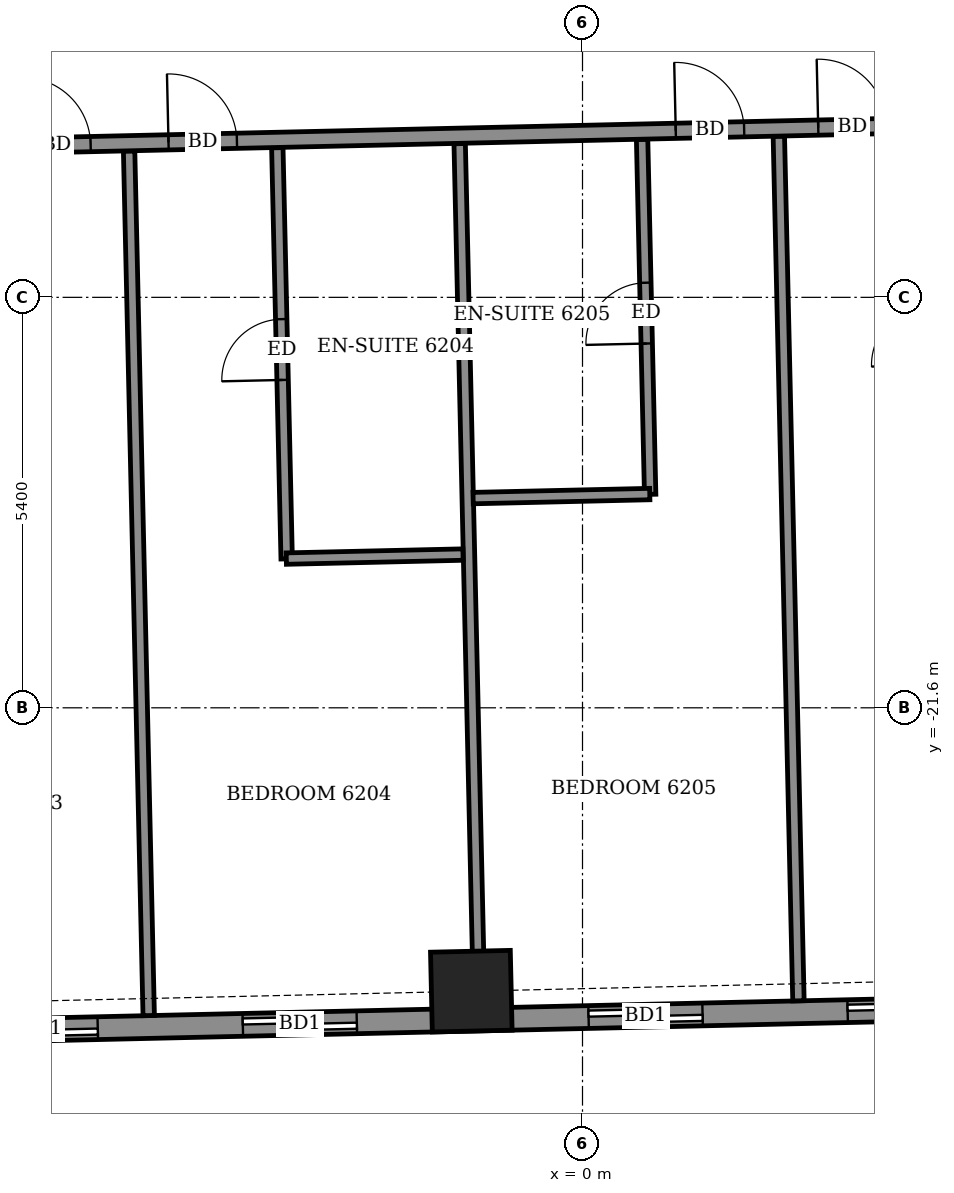
"""IFC4 building model, lengths in metres.
Left out: names, types, materials, properties, quantities, classifications, styles, units other than length and angle.
Written with IfcOpenShell. Run it as: python <this file> out.ifc"""

import sys

from ifc_helpers import new_model, si_unit, direction, frame, frame_2d, origin, origin_2d, place, context, subcontext, project, spatial, rectangle, extrude, element, fill, save


model = new_model("IFC4")
c1 = context("Model", 3, precision=1e-05, world=origin(), true_north=direction((0.0, 1.0)))
c2 = subcontext(c1, "Body", "Model", "MODEL_VIEW")
j1 = project(units=[si_unit("LENGTHUNIT", "METRE"), si_unit("PLANEANGLEUNIT", "RADIAN")], contexts=[c1])
p1 = place(None, origin())
s1 = spatial("IfcSite", under=j1, at=p1, CompositionType="ELEMENT")
p2 = place(p1, origin())
s2 = spatial("IfcBuilding", under=s1, at=p2, CompositionType="ELEMENT")
p3 = place(p2, frame((0.0, 0.0, 245.5)))
s3 = spatial("IfcBuildingStorey", under=s2, at=p3, CompositionType="ELEMENT", Elevation=245.5)
p4 = place(p3, frame((-1.463, -25.328, -0.55), z_axis=(0.0, 0.0, 1.0), x_axis=(0.999743095343, 0.022665906441, 0.0)))
e1 = element("IfcColumn", 1, at=p4, inside=s3, PredefinedType="COLUMN", context=c2, shape_type="SweptSolid", body=[
    extrude(rectangle(XDim=1.05, YDim=1.05, at=origin_2d()), origin(), (0.0, 0.0, 1.0), 3.6),
])
p5 = place(p3, frame((-23.403, -26.201, 0.0), z_axis=(0.0, 0.0, 1.0), x_axis=(0.999742770494, 0.022680230258, 0.0)))
e2 = element("IfcWall", 2, at=p5, inside=s3, PredefinedType="SOLIDWALL", context=c2, shape_type="SweptSolid", body=[
    extrude(rectangle(XDim=43.908, YDim=0.3, at=frame_2d((21.954, 0.0))), origin(), (0.0, 0.0, 1.0), 2.55),
])
p6 = place(p5, frame((1.951, 0.0, 0.0)))
e3 = element("IfcOpeningElement", 3, at=p6, cuts=e2, PredefinedType="OPENING", context=c2, shape_type="SweptSolid", body=[
    extrude(rectangle(XDim=1.5, YDim=2.4, at=frame_2d((0.75, 1.2))), frame((0.0, 0.16, 0.0), z_axis=(0.0, -1.0, 0.0), x_axis=(1.0, 0.0, 0.0)), (0.0, 0.0, 1.0), 0.32),
])
p7 = place(p5, frame((5.272, 0.0, 0.0)))
e4 = element("IfcOpeningElement", 4, at=p7, cuts=e2, PredefinedType="OPENING", context=c2, shape_type="SweptSolid", body=[
    extrude(rectangle(XDim=1.2, YDim=2.4, at=frame_2d((0.6, 1.2))), frame((0.0, 0.16, 0.0), z_axis=(0.0, -1.0, 0.0), x_axis=(1.0, 0.0, 0.0)), (0.0, 0.0, 1.0), 0.32),
])
p8 = place(p5, frame((10.475, 0.0, 0.0)))
e5 = element("IfcOpeningElement", 5, at=p8, cuts=e2, PredefinedType="OPENING", context=c2, shape_type="SweptSolid", body=[
    extrude(rectangle(XDim=1.5, YDim=2.4, at=frame_2d((0.75, 1.2))), frame((0.0, 0.16, 0.0), z_axis=(0.0, -1.0, 0.0), x_axis=(1.0, 0.0, 0.0)), (0.0, 0.0, 1.0), 0.32),
])
p9 = place(p5, frame((15.53, 0.0, 0.0)))
e6 = element("IfcOpeningElement", 6, at=p9, cuts=e2, PredefinedType="OPENING", context=c2, shape_type="SweptSolid", body=[
    extrude(rectangle(XDim=1.5, YDim=2.4, at=frame_2d((0.75, 1.2))), frame((0.0, 0.16, 0.0), z_axis=(0.0, -1.0, 0.0), x_axis=(1.0, 0.0, 0.0)), (0.0, 0.0, 1.0), 0.32),
])
p10 = place(p5, frame((18.939, 0.0, 0.0)))
e7 = element("IfcOpeningElement", 7, at=p10, cuts=e2, PredefinedType="OPENING", context=c2, shape_type="SweptSolid", body=[
    extrude(rectangle(XDim=1.5, YDim=2.4, at=frame_2d((0.75, 1.2))), frame((0.0, 0.16, 0.0), z_axis=(0.0, -1.0, 0.0), x_axis=(1.0, 0.0, 0.0)), (0.0, 0.0, 1.0), 0.32),
])
p11 = place(p5, frame((23.489, 0.0, 0.0)))
e8 = element("IfcOpeningElement", 8, at=p11, cuts=e2, PredefinedType="OPENING", context=c2, shape_type="SweptSolid", body=[
    extrude(rectangle(XDim=1.5, YDim=2.4, at=frame_2d((0.75, 1.2))), frame((0.0, 0.16, 0.0), z_axis=(0.0, -1.0, 0.0), x_axis=(1.0, 0.0, 0.0)), (0.0, 0.0, 1.0), 0.32),
])
p12 = place(p5, frame((26.898, 0.0, 0.0)))
e9 = element("IfcOpeningElement", 9, at=p12, cuts=e2, PredefinedType="OPENING", context=c2, shape_type="SweptSolid", body=[
    extrude(rectangle(XDim=1.5, YDim=2.4, at=frame_2d((0.75, 1.2))), frame((0.0, 0.16, 0.0), z_axis=(0.0, -1.0, 0.0), x_axis=(1.0, 0.0, 0.0)), (0.0, 0.0, 1.0), 0.32),
])
p13 = place(p5, frame((32.05, 0.0, 0.0)))
e10 = element("IfcOpeningElement", 10, at=p13, cuts=e2, PredefinedType="OPENING", context=c2, shape_type="SweptSolid", body=[
    extrude(rectangle(XDim=1.5, YDim=2.4, at=frame_2d((0.75, 1.2))), frame((0.0, 0.16, 0.0), z_axis=(0.0, -1.0, 0.0), x_axis=(1.0, 0.0, 0.0)), (0.0, 0.0, 1.0), 0.32),
])
p14 = place(p5, frame((37.382, 0.0, 0.0)))
e11 = element("IfcOpeningElement", 11, at=p14, cuts=e2, PredefinedType="OPENING", context=c2, shape_type="SweptSolid", body=[
    extrude(rectangle(XDim=1.5, YDim=2.4, at=frame_2d((0.75, 1.2))), frame((0.0, 0.16, 0.0), z_axis=(0.0, -1.0, 0.0), x_axis=(1.0, 0.0, 0.0)), (0.0, 0.0, 1.0), 0.32),
])
p15 = place(p5, frame((40.057, 0.0, 0.9)))
e12 = element("IfcOpeningElement", 12, at=p15, cuts=e2, PredefinedType="OPENING", context=c2, shape_type="SweptSolid", body=[
    extrude(rectangle(XDim=2.4, YDim=1.5, at=frame_2d((1.2, 0.75))), frame((0.0, 0.16, 0.0), z_axis=(0.0, -1.0, 0.0), x_axis=(1.0, 0.0, 0.0)), (0.0, 0.0, 1.0), 0.32),
])
p16 = place(p3, frame((-5.707, -25.649, 0.0), z_axis=(0.0, 0.0, 1.0), x_axis=(-0.022684355347, 0.999742676904, 0.0)))
e13 = element("IfcWall", 13, at=p16, inside=s3, PredefinedType="PARTITIONING", context=c2, shape_type="SweptSolid", body=[
    extrude(rectangle(XDim=11.376, YDim=0.15, at=frame_2d((5.688, 0.0))), origin(), (0.0, 0.0, 1.0), 2.5),
])
p17 = place(p3, frame((-1.358, -25.551, 0.0), z_axis=(0.0, 0.0, 1.0), x_axis=(-0.022684355347, 0.999742676904, 0.0)))
e14 = element("IfcWall", 14, at=p17, inside=s3, PredefinedType="PARTITIONING", context=c2, shape_type="SweptSolid", body=[
    extrude(rectangle(XDim=11.376, YDim=0.15, at=frame_2d((5.688, 0.0))), origin(), (0.0, 0.0, 1.0), 3.05),
])
p18 = place(p3, frame((2.841, -25.455, 0.0), z_axis=(0.0, 0.0, 1.0), x_axis=(-0.022684355347, 0.999742676904, 0.0)))
e15 = element("IfcWall", 15, at=p18, inside=s3, PredefinedType="PARTITIONING", context=c2, shape_type="SweptSolid", body=[
    extrude(rectangle(XDim=11.376, YDim=0.15, at=frame_2d((5.688, 0.0))), origin(), (0.0, 0.0, 1.0), 2.5),
])
p19 = place(p3, frame((-3.892, -19.641, 0.0), z_axis=(0.0, 0.0, 1.0), x_axis=(-0.022696805576, 0.999742394328, 0.0)))
e16 = element("IfcWall", 16, at=p19, inside=s3, PredefinedType="PARTITIONING", context=c2, shape_type="SweptSolid", body=[
    extrude(rectangle(XDim=5.411, YDim=0.15, at=frame_2d((2.705, 0.0))), origin(), (0.0, 0.0, 1.0), 3.05),
])
p20 = place(p19, frame((2.355, 0.0, 0.0)))
e17 = element("IfcOpeningElement", 17, at=p20, cuts=e16, PredefinedType="OPENING", context=c2, shape_type="SweptSolid", body=[
    extrude(rectangle(XDim=0.8, YDim=2.1, at=frame_2d((0.4, 1.05))), frame((0.0, 0.085, 0.0), z_axis=(0.0, -1.0, 0.0), x_axis=(1.0, 0.0, 0.0)), (0.0, 0.0, 1.0), 0.17),
])
p21 = place(p3, frame((-3.897, -19.637, 0.0), z_axis=(0.0, 0.0, 1.0), x_axis=(0.999740478815, 0.022781023197, 0.0)))
e18 = element("IfcWall", 18, at=p21, inside=s3, PredefinedType="PARTITIONING", context=c2, shape_type="SweptSolid", body=[
    extrude(rectangle(XDim=2.325, YDim=0.15, at=frame_2d((1.163, 0.0))), origin(), (0.0, 0.0, 1.0), 3.05),
])
p22 = place(p3, frame((0.89, -18.792, 0.0), z_axis=(0.0, 0.0, 1.0), x_axis=(-0.022688155425, 0.999742590672, 0.0)))
e19 = element("IfcWall", 19, at=p22, inside=s3, PredefinedType="PARTITIONING", context=c2, shape_type="SweptSolid", body=[
    extrude(rectangle(XDim=4.67, YDim=0.15, at=frame_2d((2.335, 0.0))), origin(), (0.0, 0.0, 1.0), 3.05),
])
p23 = place(p22, frame((1.985, 0.0, 0.0)))
e20 = element("IfcOpeningElement", 20, at=p23, cuts=e19, PredefinedType="OPENING", context=c2, shape_type="SweptSolid", body=[
    extrude(rectangle(XDim=0.8, YDim=2.1, at=frame_2d((0.4, 1.05))), frame((0.0, 0.085, 0.0), z_axis=(0.0, -1.0, 0.0), x_axis=(1.0, 0.0, 0.0)), (0.0, 0.0, 1.0), 0.17),
])
p24 = place(p3, frame((-1.439, -18.841, 0.0), z_axis=(0.0, 0.0, 1.0), x_axis=(0.999740260747, 0.02279059109, 0.0)))
e21 = element("IfcWall", 21, at=p24, inside=s3, PredefinedType="PARTITIONING", context=c2, shape_type="SweptSolid", body=[
    extrude(rectangle(XDim=2.324, YDim=0.15, at=frame_2d((1.162, 0.0))), origin(), (0.0, 0.0, 1.0), 3.05),
])
p25 = place(p3, frame((-27.016, -14.65, 0.0), z_axis=(0.0, 0.0, 1.0), x_axis=(0.999742874861, 0.022675629315, 0.0)))
e22 = element("IfcWall", 22, at=p25, inside=s3, PredefinedType="PARTITIONING", context=c2, shape_type="SweptSolid", body=[
    extrude(rectangle(XDim=50.883, YDim=0.2, at=frame_2d((25.442, 0.0))), origin(), (0.0, 0.0, 1.0), 3.05),
])
p26 = place(p25, frame((1.575, 0.0, 0.0)))
e23 = element("IfcOpeningElement", 23, at=p26, cuts=e22, PredefinedType="OPENING", context=c2, shape_type="SweptSolid", body=[
    extrude(rectangle(XDim=1.0, YDim=2.1, at=frame_2d((0.5, 1.05))), frame((0.0, 0.11, 0.0), z_axis=(0.0, -1.0, 0.0), x_axis=(1.0, 0.0, 0.0)), (0.0, 0.0, 1.0), 0.22),
])
p27 = place(p25, frame((6.4, 0.0, 0.0)))
e24 = element("IfcOpeningElement", 24, at=p27, cuts=e22, PredefinedType="OPENING", context=c2, shape_type="SweptSolid", body=[
    extrude(rectangle(XDim=0.9, YDim=2.1, at=frame_2d((0.45, 1.05))), frame((0.0, 0.11, 0.0), z_axis=(0.0, -1.0, 0.0), x_axis=(1.0, 0.0, 0.0)), (0.0, 0.0, 1.0), 0.22),
])
p28 = place(p25, frame((11.025, 0.0, 0.0)))
e25 = element("IfcOpeningElement", 25, at=p28, cuts=e22, PredefinedType="OPENING", context=c2, shape_type="SweptSolid", body=[
    extrude(rectangle(XDim=0.9, YDim=2.1, at=frame_2d((0.45, 1.05))), frame((0.0, 0.11, 0.0), z_axis=(0.0, -1.0, 0.0), x_axis=(1.0, 0.0, 0.0)), (0.0, 0.0, 1.0), 0.22),
])
p29 = place(p25, frame((12.925, 0.0, 0.0)))
e26 = element("IfcOpeningElement", 26, at=p29, cuts=e22, PredefinedType="OPENING", context=c2, shape_type="SweptSolid", body=[
    extrude(rectangle(XDim=0.9, YDim=2.1, at=frame_2d((0.45, 1.05))), frame((0.0, 0.11, 0.0), z_axis=(0.0, -1.0, 0.0), x_axis=(1.0, 0.0, 0.0)), (0.0, 0.0, 1.0), 0.22),
])
p30 = place(p25, frame((19.65, 0.0, 0.0)))
e27 = element("IfcOpeningElement", 27, at=p30, cuts=e22, PredefinedType="OPENING", context=c2, shape_type="SweptSolid", body=[
    extrude(rectangle(XDim=0.9, YDim=2.1, at=frame_2d((0.45, 1.05))), frame((0.0, 0.11, 0.0), z_axis=(0.0, -1.0, 0.0), x_axis=(1.0, 0.0, 0.0)), (0.0, 0.0, 1.0), 0.22),
])
p31 = place(p25, frame((21.575, 0.0, 0.0)))
e28 = element("IfcOpeningElement", 28, at=p31, cuts=e22, PredefinedType="OPENING", context=c2, shape_type="SweptSolid", body=[
    extrude(rectangle(XDim=0.9, YDim=2.1, at=frame_2d((0.45, 1.05))), frame((0.0, 0.11, 0.0), z_axis=(0.0, -1.0, 0.0), x_axis=(1.0, 0.0, 0.0)), (0.0, 0.0, 1.0), 0.22),
])
p32 = place(p25, frame((28.25, 0.0, 0.0)))
e29 = element("IfcOpeningElement", 29, at=p32, cuts=e22, PredefinedType="OPENING", context=c2, shape_type="SweptSolid", body=[
    extrude(rectangle(XDim=0.9, YDim=2.1, at=frame_2d((0.45, 1.05))), frame((0.0, 0.11, 0.0), z_axis=(0.0, -1.0, 0.0), x_axis=(1.0, 0.0, 0.0)), (0.0, 0.0, 1.0), 0.22),
])
p33 = place(p25, frame((30.125, 0.0, 0.0)))
e30 = element("IfcOpeningElement", 30, at=p33, cuts=e22, PredefinedType="OPENING", context=c2, shape_type="SweptSolid", body=[
    extrude(rectangle(XDim=0.9, YDim=2.1, at=frame_2d((0.45, 1.05))), frame((0.0, 0.11, 0.0), z_axis=(0.0, -1.0, 0.0), x_axis=(1.0, 0.0, 0.0)), (0.0, 0.0, 1.0), 0.22),
])
p34 = place(p25, frame((36.9, 0.0, 0.0)))
e31 = element("IfcOpeningElement", 31, at=p34, cuts=e22, PredefinedType="OPENING", context=c2, shape_type="SweptSolid", body=[
    extrude(rectangle(XDim=0.9, YDim=2.1, at=frame_2d((0.45, 1.05))), frame((0.0, 0.11, 0.0), z_axis=(0.0, -1.0, 0.0), x_axis=(1.0, 0.0, 0.0)), (0.0, 0.0, 1.0), 0.22),
])
p35 = place(p25, frame((38.85, 0.0, 0.0)))
e32 = element("IfcOpeningElement", 32, at=p35, cuts=e22, PredefinedType="OPENING", context=c2, shape_type="SweptSolid", body=[
    extrude(rectangle(XDim=0.9, YDim=2.1, at=frame_2d((0.45, 1.05))), frame((0.0, 0.11, 0.0), z_axis=(0.0, -1.0, 0.0), x_axis=(1.0, 0.0, 0.0)), (0.0, 0.0, 1.0), 0.22),
])
p36 = place(p25, frame((48.629, 0.0, 0.0)))
e33 = element("IfcOpeningElement", 33, at=p36, cuts=e22, PredefinedType="OPENING", context=c2, shape_type="SweptSolid", body=[
    extrude(rectangle(XDim=1.0, YDim=2.1, at=frame_2d((0.5, 1.05))), frame((0.0, 0.11, 0.0), z_axis=(0.0, -1.0, 0.0), x_axis=(1.0, 0.0, 0.0)), (0.0, 0.0, 1.0), 0.22),
])
p37 = place(p25, frame((43.6, 0.0, 0.0)))
e34 = element("IfcOpeningElement", 34, at=p37, cuts=e22, PredefinedType="OPENING", context=c2, shape_type="SweptSolid", body=[
    extrude(rectangle(XDim=0.9, YDim=2.1, at=frame_2d((0.45, 1.05))), frame((0.0, 0.11, 0.0), z_axis=(0.0, -1.0, 0.0), x_axis=(1.0, 0.0, 0.0)), (0.0, 0.0, 1.0), 0.22),
])
p38 = place(p9, origin())
e35 = element("IfcDoor", 35, at=p38, inside=s3, OperationType="SLIDING_TO_LEFT", PredefinedType="DOOR", context=c2, shape_type="SweptSolid", body=[
    extrude(rectangle(XDim=1.5, YDim=2.4, at=frame_2d((0.75, 1.2))), frame((0.0, 0.025, 0.0), z_axis=(0.0, -1.0, 0.0), x_axis=(1.0, 0.0, 0.0)), (0.0, 0.0, 1.0), 0.05),
])
fill(e6, e35)
p39 = place(p10, origin())
e36 = element("IfcDoor", 36, at=p39, inside=s3, OperationType="SLIDING_TO_LEFT", PredefinedType="DOOR", context=c2, shape_type="SweptSolid", body=[
    extrude(rectangle(XDim=1.5, YDim=2.4, at=frame_2d((0.75, 1.2))), frame((0.0, 0.025, 0.0), z_axis=(0.0, -1.0, 0.0), x_axis=(1.0, 0.0, 0.0)), (0.0, 0.0, 1.0), 0.05),
])
fill(e7, e36)
p40 = place(p11, origin())
e37 = element("IfcDoor", 37, at=p40, inside=s3, OperationType="SLIDING_TO_LEFT", PredefinedType="DOOR", context=c2, shape_type="SweptSolid", body=[
    extrude(rectangle(XDim=1.5, YDim=2.4, at=frame_2d((0.75, 1.2))), frame((0.0, 0.025, 0.0), z_axis=(0.0, -1.0, 0.0), x_axis=(1.0, 0.0, 0.0)), (0.0, 0.0, 1.0), 0.05),
])
fill(e8, e37)
p41 = place(p12, origin())
e38 = element("IfcDoor", 38, at=p41, inside=s3, OperationType="SLIDING_TO_LEFT", PredefinedType="DOOR", context=c2, shape_type="SweptSolid", body=[
    extrude(rectangle(XDim=1.5, YDim=2.4, at=frame_2d((0.75, 1.2))), frame((0.0, 0.025, 0.0), z_axis=(0.0, -1.0, 0.0), x_axis=(1.0, 0.0, 0.0)), (0.0, 0.0, 1.0), 0.05),
])
fill(e9, e38)
p42 = place(p30, origin())
e39 = element("IfcDoor", 39, at=p42, inside=s3, OperationType="SINGLE_SWING_LEFT", PredefinedType="DOOR", context=c2, shape_type="SweptSolid", body=[
    extrude(rectangle(XDim=0.9, YDim=2.1, at=frame_2d((0.45, 1.05))), frame((0.0, 0.025, 0.0), z_axis=(0.0, -1.0, 0.0), x_axis=(1.0, 0.0, 0.0)), (0.0, 0.0, 1.0), 0.05),
])
fill(e27, e39)
p43 = place(p31, origin())
e40 = element("IfcDoor", 40, at=p43, inside=s3, OperationType="SINGLE_SWING_RIGHT", PredefinedType="DOOR", context=c2, shape_type="SweptSolid", body=[
    extrude(rectangle(XDim=0.9, YDim=2.1, at=frame_2d((0.45, 1.05))), frame((0.0, 0.025, 0.0), z_axis=(0.0, -1.0, 0.0), x_axis=(1.0, 0.0, 0.0)), (0.0, 0.0, 1.0), 0.05),
])
fill(e28, e40)
p44 = place(p20, origin())
e41 = element("IfcDoor", 41, at=p44, inside=s3, OperationType="SINGLE_SWING_RIGHT", PredefinedType="DOOR", context=c2, shape_type="SweptSolid", body=[
    extrude(rectangle(XDim=0.8, YDim=2.1, at=frame_2d((0.4, 1.05))), frame((0.0, 0.025, 0.0), z_axis=(0.0, -1.0, 0.0), x_axis=(1.0, 0.0, 0.0)), (0.0, 0.0, 1.0), 0.05),
])
fill(e17, e41)
p45 = place(p32, origin())
e42 = element("IfcDoor", 42, at=p45, inside=s3, OperationType="SINGLE_SWING_LEFT", PredefinedType="DOOR", context=c2, shape_type="SweptSolid", body=[
    extrude(rectangle(XDim=0.9, YDim=2.1, at=frame_2d((0.45, 1.05))), frame((0.0, 0.025, 0.0), z_axis=(0.0, -1.0, 0.0), x_axis=(1.0, 0.0, 0.0)), (0.0, 0.0, 1.0), 0.05),
])
fill(e29, e42)
p46 = place(p23, origin())
e43 = element("IfcDoor", 43, at=p46, inside=s3, OperationType="SINGLE_SWING_LEFT", PredefinedType="DOOR", context=c2, shape_type="SweptSolid", body=[
    extrude(rectangle(XDim=0.8, YDim=2.1, at=frame_2d((0.4, 1.05))), frame((0.0, 0.025, 0.0), z_axis=(0.0, -1.0, 0.0), x_axis=(1.0, 0.0, 0.0)), (0.0, 0.0, 1.0), 0.05),
])
fill(e20, e43)
p47 = place(p33, origin())
e44 = element("IfcDoor", 44, at=p47, inside=s3, OperationType="SINGLE_SWING_RIGHT", PredefinedType="DOOR", context=c2, shape_type="SweptSolid", body=[
    extrude(rectangle(XDim=0.9, YDim=2.1, at=frame_2d((0.45, 1.05))), frame((0.0, 0.025, 0.0), z_axis=(0.0, -1.0, 0.0), x_axis=(1.0, 0.0, 0.0)), (0.0, 0.0, 1.0), 0.05),
])
fill(e30, e44)
save(model, sys.argv[1])
